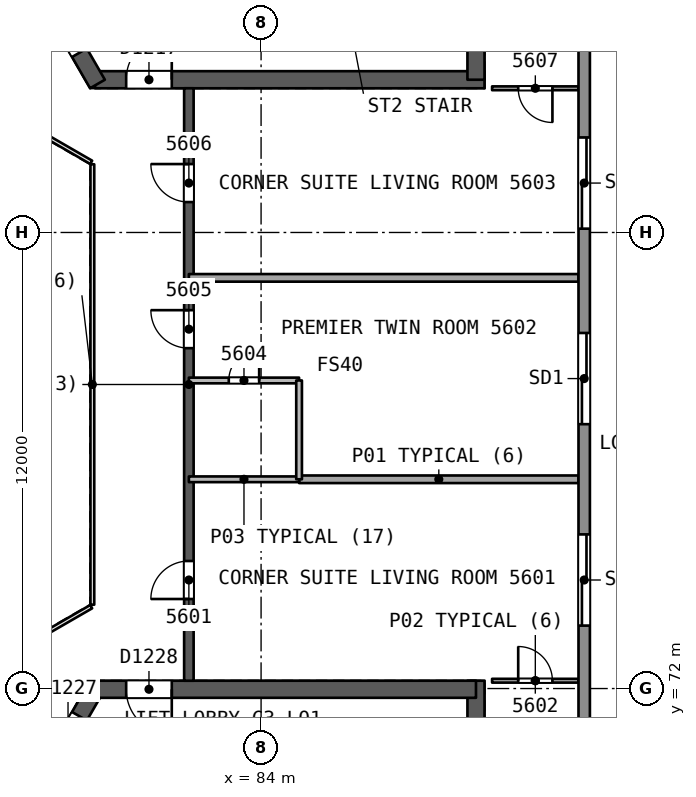
"""IFC4 building model, lengths in metres.
Left out: names, types, materials, properties, quantities, classifications, styles, units other than length and angle.
Written with IfcOpenShell. Run it as: python <this file> out.ifc"""

import sys

from ifc_helpers import new_model, si_unit, direction, frame, frame_2d, origin, place, context, subcontext, project, spatial, rectangle, extrude, element, fill, save


model = new_model("IFC4")
c1 = context("Model", 3, precision=1e-05, world=origin(), true_north=direction((0.0, 1.0)))
c2 = subcontext(c1, "Body", "Model", "MODEL_VIEW")
j1 = project(units=[si_unit("LENGTHUNIT", "METRE"), si_unit("PLANEANGLEUNIT", "RADIAN")], contexts=[c1])
p1 = place(None, origin())
s1 = spatial("IfcSite", under=j1, at=p1, CompositionType="ELEMENT")
p2 = place(p1, origin())
s2 = spatial("IfcBuilding", under=s1, at=p2, CompositionType="ELEMENT")
p3 = place(p2, frame((0.0, 0.0, 228.0)))
s3 = spatial("IfcBuildingStorey", under=s2, at=p3, CompositionType="ELEMENT", Elevation=228.0)
p4 = place(p3, frame((79.63, 88.019, 0.0), z_axis=(0.0, 0.0, 1.0), x_axis=(1.0, 0.0, 0.0)))
e1 = element("IfcWall", 1, at=p4, inside=s3, PredefinedType="SHEAR", context=c2, shape_type="SweptSolid", body=[
    extrude(rectangle(XDim=10.25, YDim=0.45, at=frame_2d((5.125, 0.0))), origin(), (0.0, 0.0, 1.0), 3.7),
])
p5 = place(p4, frame((0.82, 0.0, 0.0)))
e2 = element("IfcOpeningElement", 2, at=p5, cuts=e1, PredefinedType="OPENING", context=c2, shape_type="SweptSolid", body=[
    extrude(rectangle(XDim=1.2, YDim=2.1, at=frame_2d((0.6, 1.05))), frame((0.0, 0.235, 0.0), z_axis=(0.0, -1.0, 0.0), x_axis=(1.0, 0.0, 0.0)), (0.0, 0.0, 1.0), 0.471),
])
p6 = place(p3, frame((89.655, 88.019, 0.0), z_axis=(0.0, 0.0, 1.0), x_axis=(0.0, 1.0, 0.0)))
e3 = element("IfcWall", 3, at=p6, inside=s3, PredefinedType="SHEAR", context=c2, shape_type="SweptSolid", body=[
    extrude(rectangle(XDim=14.108, YDim=0.45, at=frame_2d((7.054, 0.0))), origin(), (0.0, 0.0, 1.0), 3.7),
])
p7 = place(p3, frame((74.617, 96.701, 0.0), z_axis=(0.0, 0.0, 1.0), x_axis=(0.499994385119, -0.866028645513, 0.0)))
e4 = element("IfcWall", 4, at=p7, inside=s3, PredefinedType="SHEAR", context=c2, shape_type="SweptSolid", body=[
    extrude(rectangle(XDim=10.155, YDim=0.45, at=frame_2d((5.077, 0.0))), origin(), (0.0, 0.0, 1.0), 3.7),
])
p8 = place(p7, frame((8.005, 0.0, 0.0)))
e5 = element("IfcOpeningElement", 5, at=p8, cuts=e4, PredefinedType="OPENING", context=c2, shape_type="SweptSolid", body=[
    extrude(rectangle(XDim=1.2, YDim=2.1, at=frame_2d((0.6, 1.05))), frame((0.0, 0.235, 0.0), z_axis=(0.0, -1.0, 0.0), x_axis=(1.0, 0.0, 0.0)), (0.0, 0.0, 1.0), 0.471),
])
p9 = place(p3, frame((79.63, 71.981, 0.0), z_axis=(0.0, 0.0, 1.0), x_axis=(-0.500002171595, -0.86602415001, 0.0)))
e6 = element("IfcWall", 6, at=p9, inside=s3, PredefinedType="SHEAR", context=c2, shape_type="SweptSolid", body=[
    extrude(rectangle(XDim=10.25, YDim=0.45, at=frame_2d((5.125, 0.0))), origin(), (0.0, 0.0, 1.0), 3.7),
])
p10 = place(p9, frame((0.82, 0.0, 0.0)))
e7 = element("IfcOpeningElement", 7, at=p10, cuts=e6, PredefinedType="OPENING", context=c2, shape_type="SweptSolid", body=[
    extrude(rectangle(XDim=1.2, YDim=2.1, at=frame_2d((0.6, 1.05))), frame((0.0, 0.235, 0.0), z_axis=(0.0, -1.0, 0.0), x_axis=(1.0, 0.0, 0.0)), (0.0, 0.0, 1.0), 0.471),
])
p11 = place(p3, frame((89.655, 58.002, 0.0), z_axis=(0.0, 0.0, 1.0), x_axis=(0.0, 1.0, 0.0)))
e8 = element("IfcWall", 8, at=p11, inside=s3, PredefinedType="SHEAR", context=c2, shape_type="SweptSolid", body=[
    extrude(rectangle(XDim=14.204, YDim=0.45, at=frame_2d((7.102, 0.0))), origin(), (0.0, 0.0, 1.0), 3.7),
])
p12 = place(p3, frame((89.655, 71.981, 0.0), z_axis=(0.0, 0.0, 1.0), x_axis=(-1.0, 0.0, 0.0)))
e9 = element("IfcWall", 9, at=p12, inside=s3, PredefinedType="SHEAR", context=c2, shape_type="SweptSolid", body=[
    extrude(rectangle(XDim=10.155, YDim=0.45, at=frame_2d((5.078, 0.0))), origin(), (0.0, 0.0, 1.0), 3.7),
])
p13 = place(p12, frame((8.005, 0.0, 0.0)))
e10 = element("IfcOpeningElement", 10, at=p13, cuts=e9, PredefinedType="OPENING", context=c2, shape_type="SweptSolid", body=[
    extrude(rectangle(XDim=1.2, YDim=2.1, at=frame_2d((0.6, 1.05))), frame((0.0, 0.235, 0.0), z_axis=(0.0, -1.0, 0.0), x_axis=(1.0, 0.0, 0.0)), (0.0, 0.0, 1.0), 0.471),
])
p14 = place(p3, frame((82.1, 72.206, 0.0), z_axis=(0.0, 0.0, 1.0), x_axis=(0.0, 1.0, 0.0)))
e11 = element("IfcWall", 11, at=p14, inside=s3, PredefinedType="SHEAR", context=c2, shape_type="SweptSolid", body=[
    extrude(rectangle(XDim=15.588, YDim=0.25, at=frame_2d((7.794, 0.0))), origin(), (0.0, 0.0, 1.0), 3.3),
])
p15 = place(p14, frame((2.15, 0.0, 0.0)))
e12 = element("IfcOpeningElement", 12, at=p15, cuts=e11, PredefinedType="OPENING", context=c2, shape_type="SweptSolid", body=[
    extrude(rectangle(XDim=1.0, YDim=2.1, at=frame_2d((0.5, 1.05))), frame((0.0, 0.135, 0.0), z_axis=(0.0, -1.0, 0.0), x_axis=(1.0, 0.0, 0.0)), (0.0, 0.0, 1.0), 0.271),
])
p16 = place(p14, frame((8.75, 0.0, 0.0)))
e13 = element("IfcOpeningElement", 13, at=p16, cuts=e11, PredefinedType="OPENING", context=c2, shape_type="SweptSolid", body=[
    extrude(rectangle(XDim=1.0, YDim=2.1, at=frame_2d((0.5, 1.05))), frame((0.0, 0.135, 0.0), z_axis=(0.0, -1.0, 0.0), x_axis=(1.0, 0.0, 0.0)), (0.0, 0.0, 1.0), 0.271),
])
p17 = place(p14, frame((12.594, 0.0, 0.0)))
e14 = element("IfcOpeningElement", 14, at=p17, cuts=e11, PredefinedType="OPENING", context=c2, shape_type="SweptSolid", body=[
    extrude(rectangle(XDim=1.0, YDim=2.1, at=frame_2d((0.5, 1.05))), frame((0.0, 0.135, 0.0), z_axis=(0.0, -1.0, 0.0), x_axis=(1.0, 0.0, 0.0)), (0.0, 0.0, 1.0), 0.271),
])
p18 = place(p3, frame((90.079, 72.206, 0.0), z_axis=(0.0, 0.0, 1.0), x_axis=(1.0, 0.0, 0.0)))
e15 = element("IfcWall", 15, at=p18, inside=s3, PredefinedType="PARTITIONING", context=c2, shape_type="SweptSolid", body=[
    extrude(rectangle(XDim=2.274, YDim=0.1, at=frame_2d((1.137, 0.0))), origin(), (0.0, 0.0, 1.0), 3.3),
])
p19 = place(p18, frame((0.687, 0.0, 0.0)))
e16 = element("IfcOpeningElement", 16, at=p19, cuts=e15, PredefinedType="OPENING", context=c2, shape_type="SweptSolid", body=[
    extrude(rectangle(XDim=0.9, YDim=2.1, at=frame_2d((0.45, 1.05))), frame((0.0, 0.061, 0.0), z_axis=(0.0, -1.0, 0.0), x_axis=(1.0, 0.0, 0.0)), (0.0, 0.0, 1.0), 0.121),
])
p20 = place(p3, frame((92.354, 77.506, 0.0), z_axis=(0.0, 0.0, 1.0), x_axis=(-1.0, 0.0, 0.0)))
e17 = element("IfcWall", 17, at=p20, inside=s3, PredefinedType="PARTITIONING", context=c2, shape_type="SweptSolid", body=[
    extrude(rectangle(XDim=7.354, YDim=0.2, at=frame_2d((3.677, 0.0))), origin(), (0.0, 0.0, 1.0), 3.3),
])
p21 = place(p3, frame((85.0, 77.506, 0.0), z_axis=(0.0, 0.0, 1.0), x_axis=(-1.0, 0.0, 0.0)))
e18 = element("IfcWall", 18, at=p21, inside=s3, PredefinedType="PARTITIONING", context=c2, shape_type="SweptSolid", body=[
    extrude(rectangle(XDim=2.9, YDim=0.15, at=frame_2d((1.45, 0.0))), origin(), (0.0, 0.0, 1.0), 3.3),
])
p22 = place(p3, frame((82.1, 80.106, 0.0), z_axis=(0.0, 0.0, 1.0), x_axis=(1.0, 0.0, 0.0)))
e19 = element("IfcWall", 19, at=p22, inside=s3, PredefinedType="PARTITIONING", context=c2, shape_type="SweptSolid", body=[
    extrude(rectangle(XDim=2.9, YDim=0.15, at=frame_2d((1.45, 0.0))), origin(), (0.0, 0.0, 1.0), 3.3),
])
p23 = place(p22, frame((1.05, 0.0, 0.0)))
e20 = element("IfcOpeningElement", 20, at=p23, cuts=e19, PredefinedType="OPENING", context=c2, shape_type="SweptSolid", body=[
    extrude(rectangle(XDim=0.8, YDim=2.1, at=frame_2d((0.4, 1.05))), frame((0.0, 0.085, 0.0), z_axis=(0.0, -1.0, 0.0), x_axis=(1.0, 0.0, 0.0)), (0.0, 0.0, 1.0), 0.171),
])
p24 = place(p3, frame((85.0, 80.106, 0.0), z_axis=(0.0, 0.0, 1.0), x_axis=(0.0, -1.0, 0.0)))
e21 = element("IfcWall", 21, at=p24, inside=s3, PredefinedType="PARTITIONING", context=c2, shape_type="SweptSolid", body=[
    extrude(rectangle(XDim=2.6, YDim=0.15, at=frame_2d((1.3, 0.0))), origin(), (0.0, 0.0, 1.0), 3.3),
])
p25 = place(p3, frame((92.354, 82.806, 0.0), z_axis=(0.0, 0.0, 1.0), x_axis=(-1.0, 0.0, 0.0)))
e22 = element("IfcWall", 22, at=p25, inside=s3, PredefinedType="PARTITIONING", context=c2, shape_type="SweptSolid", body=[
    extrude(rectangle(XDim=10.253, YDim=0.2, at=frame_2d((5.127, 0.0))), origin(), (0.0, 0.0, 1.0), 3.3),
])
p26 = place(p3, frame((92.354, 87.794, 0.0), z_axis=(0.0, 0.0, 1.0), x_axis=(-1.0, 0.0, 0.0)))
e23 = element("IfcWall", 23, at=p26, inside=s3, PredefinedType="PARTITIONING", context=c2, shape_type="SweptSolid", body=[
    extrude(rectangle(XDim=2.274, YDim=0.1, at=frame_2d((1.137, 0.0))), origin(), (0.0, 0.0, 1.0), 3.3),
])
p27 = place(p26, frame((0.687, 0.0, 0.0)))
e24 = element("IfcOpeningElement", 24, at=p27, cuts=e23, PredefinedType="OPENING", context=c2, shape_type="SweptSolid", body=[
    extrude(rectangle(XDim=0.9, YDim=2.1, at=frame_2d((0.45, 1.05))), frame((0.0, 0.061, 0.0), z_axis=(0.0, -1.0, 0.0), x_axis=(1.0, 0.0, 0.0)), (0.0, 0.0, 1.0), 0.121),
])
p28 = place(p3, frame((92.503, 105.166, 0.0), z_axis=(0.0, 0.0, 1.0), x_axis=(0.0, -1.0, 0.0)))
e25 = element("IfcWall", 25, at=p28, inside=s3, PredefinedType="SOLIDWALL", context=c2, shape_type="SweptSolid", body=[
    extrude(rectangle(XDim=50.333, YDim=0.3, at=frame_2d((25.166, 0.0))), origin(), (0.0, 0.0, 1.0), 3.3),
])
p29 = place(p28, frame((29.111, 0.0, 0.0)))
e26 = element("IfcOpeningElement", 26, at=p29, cuts=e25, PredefinedType="OPENING", context=c2, shape_type="SweptSolid", body=[
    extrude(rectangle(XDim=2.4, YDim=2.4, at=frame_2d((1.2, 1.2))), frame((0.0, 0.161, 0.0), z_axis=(0.0, -1.0, 0.0), x_axis=(1.0, 0.0, 0.0)), (0.0, 0.0, 1.0), 0.321),
])
p30 = place(p28, frame((39.164, 0.0, 0.0)))
e27 = element("IfcOpeningElement", 27, at=p30, cuts=e25, PredefinedType="OPENING", context=c2, shape_type="SweptSolid", body=[
    extrude(rectangle(XDim=2.4, YDim=2.4, at=frame_2d((1.2, 1.2))), frame((0.0, 0.161, 0.0), z_axis=(0.0, -1.0, 0.0), x_axis=(1.0, 0.0, 0.0)), (0.0, 0.0, 1.0), 0.321),
])
p31 = place(p28, frame((18.666, 0.0, 0.0)))
e28 = element("IfcOpeningElement", 28, at=p31, cuts=e25, PredefinedType="OPENING", context=c2, shape_type="SweptSolid", body=[
    extrude(rectangle(XDim=2.4, YDim=2.4, at=frame_2d((1.2, 1.2))), frame((0.0, 0.161, 0.0), z_axis=(0.0, -1.0, 0.0), x_axis=(1.0, 0.0, 0.0)), (0.0, 0.0, 1.0), 0.321),
])
p32 = place(p28, frame((8.763, 0.0, 0.0)))
e29 = element("IfcOpeningElement", 29, at=p32, cuts=e25, PredefinedType="OPENING", context=c2, shape_type="SweptSolid", body=[
    extrude(rectangle(XDim=2.4, YDim=2.4, at=frame_2d((1.2, 1.2))), frame((0.0, 0.161, 0.0), z_axis=(0.0, -1.0, 0.0), x_axis=(1.0, 0.0, 0.0)), (0.0, 0.0, 1.0), 0.321),
])
p33 = place(p28, frame((23.811, 0.0, 0.0)))
e30 = element("IfcOpeningElement", 30, at=p33, cuts=e25, PredefinedType="OPENING", context=c2, shape_type="SweptSolid", body=[
    extrude(rectangle(XDim=2.4, YDim=2.4, at=frame_2d((1.2, 1.2))), frame((0.0, 0.161, 0.0), z_axis=(0.0, -1.0, 0.0), x_axis=(1.0, 0.0, 0.0)), (0.0, 0.0, 1.0), 0.321),
])
p34 = place(p3, frame((44.454, 82.574, 0.0), z_axis=(0.0, 0.0, 1.0), x_axis=(0.86602387423, 0.500002649256, 0.0)))
e31 = element("IfcWall", 31, at=p34, inside=s3, PredefinedType="SOLIDWALL", context=c2, shape_type="SweptSolid", body=[
    extrude(rectangle(XDim=50.333, YDim=0.3, at=frame_2d((25.167, 0.0))), origin(), (0.0, 0.0, 1.0), 3.3),
])
p35 = place(p34, frame((24.122, 0.0, 0.0)))
e32 = element("IfcOpeningElement", 32, at=p35, cuts=e31, PredefinedType="OPENING", context=c2, shape_type="SweptSolid", body=[
    extrude(rectangle(XDim=2.4, YDim=2.4, at=frame_2d((1.2, 1.2))), frame((0.0, 0.161, 0.0), z_axis=(0.0, -1.0, 0.0), x_axis=(1.0, 0.0, 0.0)), (0.0, 0.0, 1.0), 0.321),
])
p36 = place(p34, frame((29.111, 0.0, 0.0)))
e33 = element("IfcOpeningElement", 33, at=p36, cuts=e31, PredefinedType="OPENING", context=c2, shape_type="SweptSolid", body=[
    extrude(rectangle(XDim=2.4, YDim=2.4, at=frame_2d((1.2, 1.2))), frame((0.0, 0.161, 0.0), z_axis=(0.0, -1.0, 0.0), x_axis=(1.0, 0.0, 0.0)), (0.0, 0.0, 1.0), 0.321),
])
p37 = place(p34, frame((39.164, 0.0, 0.0)))
e34 = element("IfcOpeningElement", 34, at=p37, cuts=e31, PredefinedType="OPENING", context=c2, shape_type="SweptSolid", body=[
    extrude(rectangle(XDim=2.4, YDim=2.4, at=frame_2d((1.2, 1.2))), frame((0.0, 0.161, 0.0), z_axis=(0.0, -1.0, 0.0), x_axis=(1.0, 0.0, 0.0)), (0.0, 0.0, 1.0), 0.321),
])
p38 = place(p34, frame((18.978, 0.0, 0.0)))
e35 = element("IfcOpeningElement", 35, at=p38, cuts=e31, PredefinedType="OPENING", context=c2, shape_type="SweptSolid", body=[
    extrude(rectangle(XDim=2.4, YDim=2.4, at=frame_2d((1.2, 1.2))), frame((0.0, 0.161, 0.0), z_axis=(0.0, -1.0, 0.0), x_axis=(1.0, 0.0, 0.0)), (0.0, 0.0, 1.0), 0.321),
])
p39 = place(p34, frame((8.763, 0.0, 0.0)))
e36 = element("IfcOpeningElement", 36, at=p39, cuts=e31, PredefinedType="OPENING", context=c2, shape_type="SweptSolid", body=[
    extrude(rectangle(XDim=2.4, YDim=2.4, at=frame_2d((1.2, 1.2))), frame((0.0, 0.161, 0.0), z_axis=(0.0, -1.0, 0.0), x_axis=(1.0, 0.0, 0.0)), (0.0, 0.0, 1.0), 0.321),
])
p40 = place(p3, frame((88.043, 52.259, 0.0), z_axis=(0.0, 0.0, 1.0), x_axis=(-0.86602387423, 0.500002649256, 0.0)))
e37 = element("IfcWall", 37, at=p40, inside=s3, PredefinedType="SOLIDWALL", context=c2, shape_type="SweptSolid", body=[
    extrude(rectangle(XDim=50.333, YDim=0.3, at=frame_2d((25.167, 0.0))), origin(), (0.0, 0.0, 1.0), 3.3),
])
p41 = place(p40, frame((23.187, 0.0, 0.0)))
e38 = element("IfcOpeningElement", 38, at=p41, cuts=e37, PredefinedType="OPENING", context=c2, shape_type="SweptSolid", body=[
    extrude(rectangle(XDim=2.4, YDim=2.4, at=frame_2d((1.2, 1.2))), frame((0.0, 0.161, 0.0), z_axis=(0.0, -1.0, 0.0), x_axis=(1.0, 0.0, 0.0)), (0.0, 0.0, 1.0), 0.321),
])
p42 = place(p40, frame((28.799, 0.0, 0.0)))
e39 = element("IfcOpeningElement", 39, at=p42, cuts=e37, PredefinedType="OPENING", context=c2, shape_type="SweptSolid", body=[
    extrude(rectangle(XDim=2.4, YDim=2.4, at=frame_2d((1.2, 1.2))), frame((0.0, 0.161, 0.0), z_axis=(0.0, -1.0, 0.0), x_axis=(1.0, 0.0, 0.0)), (0.0, 0.0, 1.0), 0.321),
])
p43 = place(p40, frame((39.164, 0.0, 0.0)))
e40 = element("IfcOpeningElement", 40, at=p43, cuts=e37, PredefinedType="OPENING", context=c2, shape_type="SweptSolid", body=[
    extrude(rectangle(XDim=2.4, YDim=2.4, at=frame_2d((1.2, 1.2))), frame((0.0, 0.161, 0.0), z_axis=(0.0, -1.0, 0.0), x_axis=(1.0, 0.0, 0.0)), (0.0, 0.0, 1.0), 0.321),
])
p44 = place(p40, frame((18.354, 0.0, 0.0)))
e41 = element("IfcOpeningElement", 41, at=p44, cuts=e37, PredefinedType="OPENING", context=c2, shape_type="SweptSolid", body=[
    extrude(rectangle(XDim=2.4, YDim=2.4, at=frame_2d((1.2, 1.2))), frame((0.0, 0.161, 0.0), z_axis=(0.0, -1.0, 0.0), x_axis=(1.0, 0.0, 0.0)), (0.0, 0.0, 1.0), 0.321),
])
p45 = place(p40, frame((8.763, 0.0, 0.0)))
e42 = element("IfcOpeningElement", 42, at=p45, cuts=e37, PredefinedType="OPENING", context=c2, shape_type="SweptSolid", body=[
    extrude(rectangle(XDim=2.4, YDim=2.4, at=frame_2d((1.2, 1.2))), frame((0.0, 0.161, 0.0), z_axis=(0.0, -1.0, 0.0), x_axis=(1.0, 0.0, 0.0)), (0.0, 0.0, 1.0), 0.321),
])
p46 = place(p3, frame((79.56, 74.206, 0.0), z_axis=(0.0, 0.0, 1.0), x_axis=(0.0, 1.0, 0.0)))
e43 = element("IfcWall", 43, at=p46, inside=s3, PredefinedType="PARTITIONING", context=c2, shape_type="SweptSolid", body=[
    extrude(rectangle(XDim=11.588, YDim=0.1, at=frame_2d((5.794, 0.0))), origin(), (0.0, 0.0, 1.0), 3.3),
])
for number, where, z_axis, x_axis in (
    (44, (79.53, 85.846, 0.0), (0.0, 0.0, 1.0), (-0.866, 0.5, 0.0)),
    (45, (77.798, 73.154, 0.0), (0.0, 0.0, 1.0), (0.866, 0.5, 0.0)),
):
    element("IfcWall", number, at=place(p3, frame(where, z_axis=z_axis, x_axis=x_axis)), inside=s3, PredefinedType="PARTITIONING", context=c2, shape_type="SweptSolid", body=[
        extrude(rectangle(XDim=2.0, YDim=0.1, at=frame_2d((1.0, 0.0))), origin(), (0.0, 0.0, 1.0), 3.3),
    ])
p47 = place(p15, origin())
e46 = element("IfcDoor", 46, at=p47, inside=s3, OperationType="SINGLE_SWING_LEFT", PredefinedType="NOTDEFINED", context=c2, shape_type="SweptSolid", body=[
    extrude(rectangle(XDim=1.0, YDim=2.1, at=frame_2d((0.5, 1.05))), frame((0.0, 0.025, 0.0), z_axis=(0.0, -1.0, 0.0), x_axis=(1.0, 0.0, 0.0)), (0.0, 0.0, 1.0), 0.05),
])
fill(e12, e46)
p48 = place(p19, origin())
e47 = element("IfcDoor", 47, at=p48, inside=s3, OperationType="SINGLE_SWING_LEFT", PredefinedType="NOTDEFINED", context=c2, shape_type="SweptSolid", body=[
    extrude(rectangle(XDim=0.9, YDim=2.1, at=frame_2d((0.45, 1.05))), frame((0.0, 0.025, 0.0), z_axis=(0.0, -1.0, 0.0), x_axis=(1.0, 0.0, 0.0)), (0.0, 0.0, 1.0), 0.05),
])
fill(e16, e47)
p49 = place(p23, origin())
e48 = element("IfcDoor", 48, at=p49, inside=s3, OperationType="SINGLE_SWING_RIGHT", PredefinedType="NOTDEFINED", context=c2, shape_type="SweptSolid", body=[
    extrude(rectangle(XDim=0.8, YDim=2.1, at=frame_2d((0.4, 1.05))), frame((0.0, 0.025, 0.0), z_axis=(0.0, -1.0, 0.0), x_axis=(1.0, 0.0, 0.0)), (0.0, 0.0, 1.0), 0.05),
])
fill(e20, e48)
p50 = place(p16, origin())
e49 = element("IfcDoor", 49, at=p50, inside=s3, OperationType="SINGLE_SWING_RIGHT", PredefinedType="NOTDEFINED", context=c2, shape_type="SweptSolid", body=[
    extrude(rectangle(XDim=1.0, YDim=2.1, at=frame_2d((0.5, 1.05))), frame((0.0, 0.025, 0.0), z_axis=(0.0, -1.0, 0.0), x_axis=(1.0, 0.0, 0.0)), (0.0, 0.0, 1.0), 0.05),
])
fill(e13, e49)
p51 = place(p17, origin())
e50 = element("IfcDoor", 50, at=p51, inside=s3, OperationType="SINGLE_SWING_RIGHT", PredefinedType="NOTDEFINED", context=c2, shape_type="SweptSolid", body=[
    extrude(rectangle(XDim=1.0, YDim=2.1, at=frame_2d((0.5, 1.05))), frame((0.0, 0.025, 0.0), z_axis=(0.0, -1.0, 0.0), x_axis=(1.0, 0.0, 0.0)), (0.0, 0.0, 1.0), 0.05),
])
fill(e14, e50)
p52 = place(p27, origin())
e51 = element("IfcDoor", 51, at=p52, inside=s3, OperationType="SINGLE_SWING_LEFT", PredefinedType="NOTDEFINED", context=c2, shape_type="SweptSolid", body=[
    extrude(rectangle(XDim=0.9, YDim=2.1, at=frame_2d((0.45, 1.05))), frame((0.0, 0.025, 0.0), z_axis=(0.0, -1.0, 0.0), x_axis=(1.0, 0.0, 0.0)), (0.0, 0.0, 1.0), 0.05),
])
fill(e24, e51)
p53 = place(p29, origin())
e52 = element("IfcDoor", 52, at=p53, inside=s3, OperationType="SLIDING_TO_LEFT", PredefinedType="NOTDEFINED", context=c2, shape_type="SweptSolid", body=[
    extrude(rectangle(XDim=2.4, YDim=2.4, at=frame_2d((1.2, 1.2))), frame((0.0, 0.025, 0.0), z_axis=(0.0, -1.0, 0.0), x_axis=(1.0, 0.0, 0.0)), (0.0, 0.0, 1.0), 0.05),
])
fill(e26, e52)
p54 = place(p31, origin())
e53 = element("IfcDoor", 53, at=p54, inside=s3, OperationType="SLIDING_TO_LEFT", PredefinedType="NOTDEFINED", context=c2, shape_type="SweptSolid", body=[
    extrude(rectangle(XDim=2.4, YDim=2.4, at=frame_2d((1.2, 1.2))), frame((0.0, 0.025, 0.0), z_axis=(0.0, -1.0, 0.0), x_axis=(1.0, 0.0, 0.0)), (0.0, 0.0, 1.0), 0.05),
])
fill(e28, e53)
p55 = place(p33, origin())
e54 = element("IfcDoor", 54, at=p55, inside=s3, OperationType="SLIDING_TO_LEFT", PredefinedType="NOTDEFINED", context=c2, shape_type="SweptSolid", body=[
    extrude(rectangle(XDim=2.4, YDim=2.4, at=frame_2d((1.2, 1.2))), frame((0.0, 0.025, 0.0), z_axis=(0.0, -1.0, 0.0), x_axis=(1.0, 0.0, 0.0)), (0.0, 0.0, 1.0), 0.05),
])
fill(e30, e54)
p56 = place(p5, origin())
e55 = element("IfcDoor", 55, at=p56, inside=s3, OperationType="SINGLE_SWING_RIGHT", PredefinedType="NOTDEFINED", context=c2, shape_type="SweptSolid", body=[
    extrude(rectangle(XDim=1.2, YDim=2.1, at=frame_2d((0.6, 1.05))), frame((0.0, 0.025, 0.0), z_axis=(0.0, -1.0, 0.0), x_axis=(1.0, 0.0, 0.0)), (0.0, 0.0, 1.0), 0.05),
])
fill(e2, e55)
p57 = place(p8, origin())
e56 = element("IfcDoor", 56, at=p57, inside=s3, OperationType="SINGLE_SWING_LEFT", PredefinedType="NOTDEFINED", context=c2, shape_type="SweptSolid", body=[
    extrude(rectangle(XDim=1.2, YDim=2.1, at=frame_2d((0.6, 1.05))), frame((0.0, 0.025, 0.0), z_axis=(0.0, -1.0, 0.0), x_axis=(1.0, 0.0, 0.0)), (0.0, 0.0, 1.0), 0.05),
])
fill(e5, e56)
p58 = place(p10, origin())
e57 = element("IfcDoor", 57, at=p58, inside=s3, OperationType="SINGLE_SWING_RIGHT", PredefinedType="NOTDEFINED", context=c2, shape_type="SweptSolid", body=[
    extrude(rectangle(XDim=1.2, YDim=2.1, at=frame_2d((0.6, 1.05))), frame((0.0, 0.025, 0.0), z_axis=(0.0, -1.0, 0.0), x_axis=(1.0, 0.0, 0.0)), (0.0, 0.0, 1.0), 0.05),
])
fill(e7, e57)
p59 = place(p13, origin())
e58 = element("IfcDoor", 58, at=p59, inside=s3, OperationType="SINGLE_SWING_LEFT", PredefinedType="NOTDEFINED", context=c2, shape_type="SweptSolid", body=[
    extrude(rectangle(XDim=1.2, YDim=2.1, at=frame_2d((0.6, 1.05))), frame((0.0, 0.025, 0.0), z_axis=(0.0, -1.0, 0.0), x_axis=(1.0, 0.0, 0.0)), (0.0, 0.0, 1.0), 0.05),
])
fill(e10, e58)
save(model, sys.argv[1])
